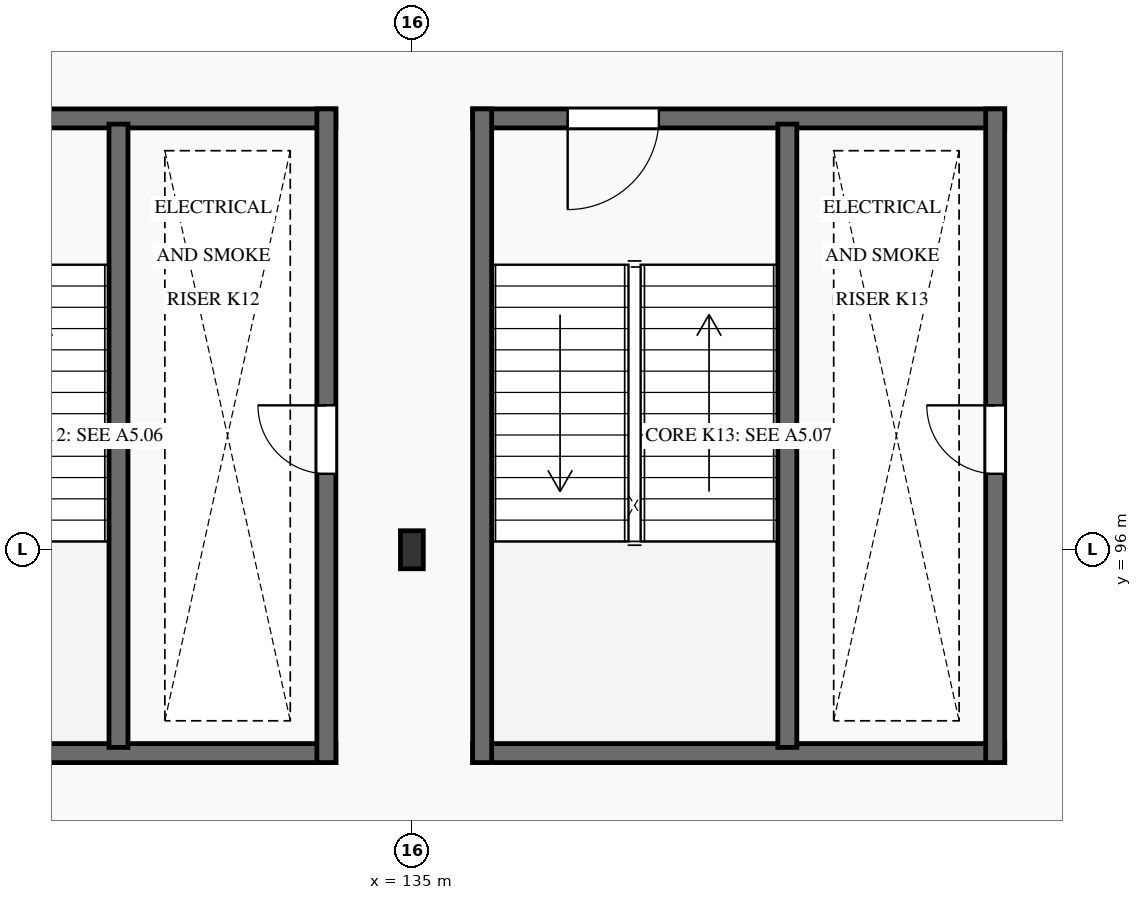
"""IFC4 building model, lengths in metres.
Left out: names, types, materials, properties, quantities, classifications, styles, units other than length and angle.
Written with IfcOpenShell. Run it as: python <this file> out.ifc"""

import sys

from ifc_helpers import new_model, si_unit, direction, frame, frame_2d, origin, origin_2d, place, context, subcontext, project, spatial, rectangle, i_section, extrude, element, fill, save


model = new_model("IFC4")
c1 = context("Model", 3, precision=1e-05, world=origin(), true_north=direction((0.0, 1.0)))
c2 = subcontext(c1, "Body", "Model", "MODEL_VIEW")
j1 = project(units=[si_unit("LENGTHUNIT", "METRE"), si_unit("PLANEANGLEUNIT", "RADIAN")], contexts=[c1])
p1 = place(None, origin())
s1 = spatial("IfcSite", under=j1, at=p1, CompositionType="ELEMENT")
p2 = place(p1, origin())
s2 = spatial("IfcBuilding", under=s1, at=p2, CompositionType="ELEMENT")
p3 = place(p2, frame((0.0, 0.0, 6.0)))
s3 = spatial("IfcBuildingStorey", under=s2, at=p3, CompositionType="ELEMENT", Elevation=6.0)
p4 = place(p3, frame((135.0, 96.0, 0.0), z_axis=(0.0, 0.0, 1.0), x_axis=(1.0, 0.0, 0.0)))
e1 = element("IfcColumn", 1, at=p4, inside=s3, PredefinedType="COLUMN", context=c2, shape_type="SweptSolid", body=[
    extrude(i_section(OverallWidth=0.3, OverallDepth=0.5, WebThickness=0.014, FlangeThickness=0.028, FilletRadius=0.027, at=origin_2d()), origin(), (0.0, 0.0, 1.0), 4.8),
])
p5 = place(p3, frame((127.0, 93.325, 0.0), z_axis=(0.0, 0.0, 1.0), x_axis=(1.0, 0.0, 0.0)))
e2 = element("IfcWall", 2, at=p5, inside=s3, PredefinedType="SHEAR", context=c2, shape_type="SweptSolid", body=[
    extrude(rectangle(XDim=7.0, YDim=0.25, at=frame_2d((3.5, 0.0))), origin(), (0.0, 0.0, 1.0), 4.8),
])
p6 = place(p3, frame((127.0, 101.675, 0.0), z_axis=(0.0, 0.0, 1.0), x_axis=(1.0, 0.0, 0.0)))
e3 = element("IfcWall", 3, at=p6, inside=s3, PredefinedType="SHEAR", context=c2, shape_type="SweptSolid", body=[
    extrude(rectangle(XDim=7.0, YDim=0.25, at=frame_2d((3.5, 0.0))), origin(), (0.0, 0.0, 1.0), 4.8),
])
p7 = place(p6, frame((1.25, 0.0, 0.0)))
e4 = element("IfcOpeningElement", 4, at=p7, cuts=e3, PredefinedType="OPENING", context=c2, shape_type="SweptSolid", body=[
    extrude(rectangle(XDim=1.2, YDim=2.15, at=frame_2d((0.6, 1.075))), frame((0.0, 0.14, 0.0), z_axis=(0.0, -1.0, 0.0), x_axis=(1.0, 0.0, 0.0)), (0.0, 0.0, 1.0), 0.28),
])
p8 = place(p3, frame((133.875, 93.2, 0.0), z_axis=(0.0, 0.0, 1.0), x_axis=(0.0, 1.0, 0.0)))
e5 = element("IfcWall", 5, at=p8, inside=s3, PredefinedType="SHEAR", context=c2, shape_type="SweptSolid", body=[
    extrude(rectangle(XDim=8.6, YDim=0.25, at=frame_2d((4.3, 0.0))), origin(), (0.0, 0.0, 1.0), 4.8),
])
p9 = place(p8, frame((3.8, 0.0, 0.0)))
e6 = element("IfcOpeningElement", 6, at=p9, cuts=e5, PredefinedType="OPENING", context=c2, shape_type="SweptSolid", body=[
    extrude(rectangle(XDim=0.9, YDim=2.05, at=frame_2d((0.45, 1.025))), frame((0.0, 0.14, 0.0), z_axis=(0.0, -1.0, 0.0), x_axis=(1.0, 0.0, 0.0)), (0.0, 0.0, 1.0), 0.28),
])
p10 = place(p3, frame((131.14, 93.4, 0.0), z_axis=(0.0, 0.0, 1.0), x_axis=(0.0, 1.0, 0.0)))
e7 = element("IfcWall", 7, at=p10, inside=s3, PredefinedType="SHEAR", context=c2, shape_type="SweptSolid", body=[
    extrude(rectangle(XDim=8.2, YDim=0.25, at=frame_2d((4.1, 0.0))), origin(), (0.0, 0.0, 1.0), 4.8),
])
p11 = place(p3, frame((135.8, 93.325, 0.0), z_axis=(0.0, 0.0, 1.0), x_axis=(1.0, 0.0, 0.0)))
e8 = element("IfcWall", 8, at=p11, inside=s3, PredefinedType="SHEAR", context=c2, shape_type="SweptSolid", body=[
    extrude(rectangle(XDim=7.0, YDim=0.25, at=frame_2d((3.5, 0.0))), origin(), (0.0, 0.0, 1.0), 4.8),
])
p12 = place(p3, frame((135.8, 101.675, 0.0), z_axis=(0.0, 0.0, 1.0), x_axis=(1.0, 0.0, 0.0)))
e9 = element("IfcWall", 9, at=p12, inside=s3, PredefinedType="SHEAR", context=c2, shape_type="SweptSolid", body=[
    extrude(rectangle(XDim=7.0, YDim=0.25, at=frame_2d((3.5, 0.0))), origin(), (0.0, 0.0, 1.0), 4.8),
])
p13 = place(p12, frame((1.25, 0.0, 0.0)))
e10 = element("IfcOpeningElement", 10, at=p13, cuts=e9, PredefinedType="OPENING", context=c2, shape_type="SweptSolid", body=[
    extrude(rectangle(XDim=1.2, YDim=2.15, at=frame_2d((0.6, 1.075))), frame((0.0, 0.14, 0.0), z_axis=(0.0, -1.0, 0.0), x_axis=(1.0, 0.0, 0.0)), (0.0, 0.0, 1.0), 0.28),
])
p14 = place(p3, frame((135.925, 93.2, 0.0), z_axis=(0.0, 0.0, 1.0), x_axis=(0.0, 1.0, 0.0)))
e11 = element("IfcWall", 11, at=p14, inside=s3, PredefinedType="SHEAR", context=c2, shape_type="SweptSolid", body=[
    extrude(rectangle(XDim=8.6, YDim=0.25, at=frame_2d((4.3, 0.0))), origin(), (0.0, 0.0, 1.0), 4.8),
])
p15 = place(p3, frame((142.675, 93.2, 0.0), z_axis=(0.0, 0.0, 1.0), x_axis=(0.0, 1.0, 0.0)))
e12 = element("IfcWall", 12, at=p15, inside=s3, PredefinedType="SHEAR", context=c2, shape_type="SweptSolid", body=[
    extrude(rectangle(XDim=8.6, YDim=0.25, at=frame_2d((4.3, 0.0))), origin(), (0.0, 0.0, 1.0), 4.8),
])
p16 = place(p15, frame((3.8, 0.0, 0.0)))
e13 = element("IfcOpeningElement", 13, at=p16, cuts=e12, PredefinedType="OPENING", context=c2, shape_type="SweptSolid", body=[
    extrude(rectangle(XDim=0.9, YDim=2.05, at=frame_2d((0.45, 1.025))), frame((0.0, 0.14, 0.0), z_axis=(0.0, -1.0, 0.0), x_axis=(1.0, 0.0, 0.0)), (0.0, 0.0, 1.0), 0.28),
])
p17 = place(p3, frame((139.94, 93.4, 0.0), z_axis=(0.0, 0.0, 1.0), x_axis=(0.0, 1.0, 0.0)))
e14 = element("IfcWall", 14, at=p17, inside=s3, PredefinedType="SHEAR", context=c2, shape_type="SweptSolid", body=[
    extrude(rectangle(XDim=8.2, YDim=0.25, at=frame_2d((4.1, 0.0))), origin(), (0.0, 0.0, 1.0), 4.8),
])
p18 = place(p9, origin())
e15 = element("IfcDoor", 15, at=p18, inside=s3, OperationType="SINGLE_SWING_RIGHT", PredefinedType="DOOR", context=c2, shape_type="SweptSolid", body=[
    extrude(rectangle(XDim=0.9, YDim=2.05, at=frame_2d((0.45, 1.025))), frame((0.0, 0.025, 0.0), z_axis=(0.0, -1.0, 0.0), x_axis=(1.0, 0.0, 0.0)), (0.0, 0.0, 1.0), 0.05),
])
fill(e6, e15)
p19 = place(p13, frame((1.2, 0.0, 0.0), z_axis=(0.0, 0.0, 1.0), x_axis=(-1.0, 0.0, 0.0)))
e16 = element("IfcDoor", 16, at=p19, inside=s3, OperationType="SINGLE_SWING_LEFT", PredefinedType="DOOR", context=c2, shape_type="SweptSolid", body=[
    extrude(rectangle(XDim=1.2, YDim=2.15, at=frame_2d((0.6, 1.075))), frame((0.0, 0.025, 0.0), z_axis=(0.0, -1.0, 0.0), x_axis=(1.0, 0.0, 0.0)), (0.0, 0.0, 1.0), 0.05),
])
fill(e10, e16)
p20 = place(p16, origin())
e17 = element("IfcDoor", 17, at=p20, inside=s3, OperationType="SINGLE_SWING_RIGHT", PredefinedType="DOOR", context=c2, shape_type="SweptSolid", body=[
    extrude(rectangle(XDim=0.9, YDim=2.05, at=frame_2d((0.45, 1.025))), frame((0.0, 0.025, 0.0), z_axis=(0.0, -1.0, 0.0), x_axis=(1.0, 0.0, 0.0)), (0.0, 0.0, 1.0), 0.05),
])
fill(e13, e17)
save(model, sys.argv[1])
